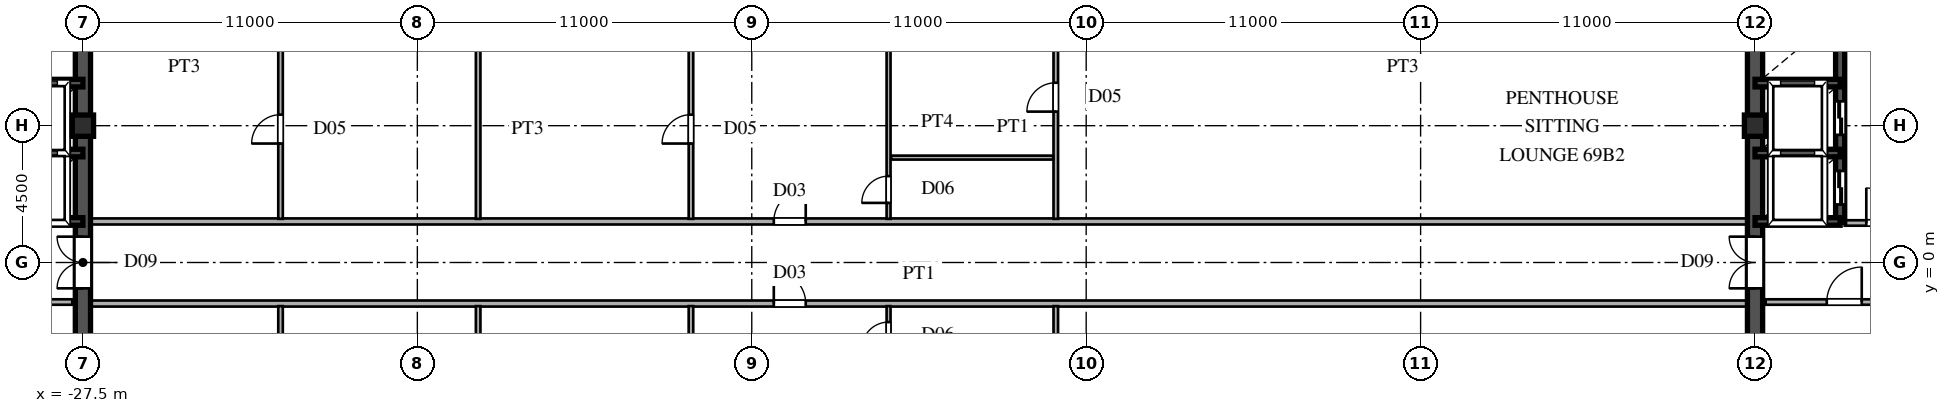
"""IFC4 building model, lengths in metres.
Left out: names, types, materials, properties, quantities, classifications, styles, units other than length and angle.
Written with IfcOpenShell. Run it as: python <this file> out.ifc"""

import sys

from ifc_helpers import new_model, si_unit, direction, frame, frame_2d, origin, origin_2d, place, context, subcontext, project, spatial, rectangle, hollow_rectangle, extrude, source, transform, mapped, element, fill, save


model = new_model("IFC4")
c1 = context("Model", 3, precision=1e-05, world=origin(), true_north=direction((0.0, 1.0)))
c2 = subcontext(c1, "Body", "Model", "MODEL_VIEW")
j1 = project(units=[si_unit("LENGTHUNIT", "METRE"), si_unit("PLANEANGLEUNIT", "RADIAN")], contexts=[c1])
p1 = place(None, origin())
s1 = spatial("IfcSite", under=j1, at=p1, CompositionType="ELEMENT")
p2 = place(p1, origin())
s2 = spatial("IfcBuilding", under=s1, at=p2, CompositionType="ELEMENT")
p3 = place(p2, frame((0.0, 0.0, 261.9)))
s3 = spatial("IfcBuildingStorey", under=s2, at=p3, CompositionType="ELEMENT", Elevation=261.9)
m1 = source(origin(), c2, "Body", "SweptSolid", [
    extrude(hollow_rectangle(XDim=0.7, YDim=0.7, WallThickness=0.03, at=origin_2d()), origin(), (0.0, 0.0, 1.0), 3.75),
])
for number, where, z_axis, x_axis in (
    (1, (-27.5, 4.5, 0.0), (0.0, 0.0, 1.0), (1.0, 0.0, 0.0)),
    (2, (27.5, 4.5, 0.0), (0.0, 0.0, 1.0), (1.0, 0.0, 0.0)),
):
    element("IfcColumn", number, at=place(p3, frame(where, z_axis=z_axis, x_axis=x_axis)), inside=s3, PredefinedType="COLUMN", context=c2, shape_type="MappedRepresentation", body=[
        mapped(m1, transform((0.0, 0.0, 0.0), scale=1.0)),
    ])
for number, where, z_axis, x_axis in (
    (3, (-27.5, -13.5, 0.0), (0.0, 0.0, 1.0), (0.0, 1.0, 0.0)),
    (4, (-27.5, 1.3, 0.0), (0.0, 0.0, 1.0), (0.0, 1.0, 0.0)),
):
    element("IfcWall", number, at=place(p3, frame(where, z_axis=z_axis, x_axis=x_axis)), inside=s3, PredefinedType="SHEAR", context=c2, shape_type="SweptSolid", body=[
        extrude(rectangle(XDim=12.2, YDim=0.5, at=frame_2d((6.1, 0.0))), origin(), (0.0, 0.0, 1.0), 3.53),
    ])
p4 = place(p3, frame((-27.5, -1.3, 0.0), z_axis=(0.0, 0.0, 1.0), x_axis=(0.0, 1.0, 0.0)))
e5 = element("IfcWall", 5, at=p4, inside=s3, PredefinedType="SHEAR", context=c2, shape_type="SweptSolid", body=[
    extrude(rectangle(XDim=2.6, YDim=0.5, at=frame_2d((1.3, 0.0))), origin(), (0.0, 0.0, 1.0), 3.53),
])
p5 = place(p4, frame((0.45, 0.0, 0.0)))
e6 = element("IfcOpeningElement", 6, at=p5, cuts=e5, PredefinedType="OPENING", context=c2, shape_type="SweptSolid", body=[
    extrude(rectangle(XDim=1.7, YDim=2.35, at=frame_2d((0.85, 1.175))), frame((0.0, 0.26, 0.0), z_axis=(0.0, -1.0, 0.0), x_axis=(1.0, 0.0, 0.0)), (0.0, 0.0, 1.0), 0.52),
])
for number, where, z_axis, x_axis in (
    (7, (-30.3, 1.35, 0.0), (0.0, 0.0, 1.0), (1.0, 0.0, 0.0)),
    (8, (-30.3, 3.6, 0.0), (0.0, 0.0, 1.0), (1.0, 0.0, 0.0)),
    (9, (-30.3, 5.9, 0.0), (0.0, 0.0, 1.0), (1.0, 0.0, 0.0)),
):
    element("IfcWall", number, at=place(p3, frame(where, z_axis=z_axis, x_axis=x_axis)), inside=s3, PredefinedType="SHEAR", context=c2, shape_type="SweptSolid", body=[
        extrude(rectangle(XDim=2.8, YDim=0.25, at=frame_2d((1.4, 0.0))), origin(), (0.0, 0.0, 1.0), 3.53),
    ])
p6 = place(p3, frame((-33.02, -1.3, 0.0), z_axis=(0.0, 0.0, 1.0), x_axis=(1.0, 0.0, 0.0)))
e10 = element("IfcWall", 10, at=p6, inside=s3, PredefinedType="PARTITIONING", context=c2, shape_type="SweptSolid", body=[
    extrude(rectangle(XDim=5.17, YDim=0.18, at=frame_2d((2.585, 0.0))), origin(), (0.0, 0.0, 1.0), 3.53),
])
p7 = place(p6, frame((2.01, 0.0, 0.0)))
e11 = element("IfcOpeningElement", 11, at=p7, cuts=e10, PredefinedType="OPENING", context=c2, shape_type="SweptSolid", body=[
    extrude(rectangle(XDim=1.15, YDim=2.2, at=frame_2d((0.575, 1.1))), frame((0.0, 0.1, 0.0), z_axis=(0.0, -1.0, 0.0), x_axis=(1.0, 0.0, 0.0)), (0.0, 0.0, 1.0), 0.2),
])
for number, where, z_axis, x_axis in (
    (12, (27.5, -13.5, 0.0), (0.0, 0.0, 1.0), (0.0, 1.0, 0.0)),
    (13, (27.5, 1.3, 0.0), (0.0, 0.0, 1.0), (0.0, 1.0, 0.0)),
):
    element("IfcWall", number, at=place(p3, frame(where, z_axis=z_axis, x_axis=x_axis)), inside=s3, PredefinedType="SHEAR", context=c2, shape_type="SweptSolid", body=[
        extrude(rectangle(XDim=12.2, YDim=0.5, at=frame_2d((6.1, 0.0))), origin(), (0.0, 0.0, 1.0), 3.53),
    ])
p8 = place(p3, frame((27.5, -1.3, 0.0), z_axis=(0.0, 0.0, 1.0), x_axis=(0.0, 1.0, 0.0)))
e14 = element("IfcWall", 14, at=p8, inside=s3, PredefinedType="SHEAR", context=c2, shape_type="SweptSolid", body=[
    extrude(rectangle(XDim=2.6, YDim=0.5, at=frame_2d((1.3, 0.0))), origin(), (0.0, 0.0, 1.0), 3.53),
])
p9 = place(p8, frame((0.45, 0.0, 0.0)))
e15 = element("IfcOpeningElement", 15, at=p9, cuts=e14, PredefinedType="OPENING", context=c2, shape_type="SweptSolid", body=[
    extrude(rectangle(XDim=1.7, YDim=2.35, at=frame_2d((0.85, 1.175))), frame((0.0, 0.26, 0.0), z_axis=(0.0, -1.0, 0.0), x_axis=(1.0, 0.0, 0.0)), (0.0, 0.0, 1.0), 0.52),
])
for number, where, z_axis, x_axis in (
    (16, (27.5, 1.35, 0.0), (0.0, 0.0, 1.0), (1.0, 0.0, 0.0)),
    (17, (27.5, 3.6, 0.0), (0.0, 0.0, 1.0), (1.0, 0.0, 0.0)),
    (18, (27.5, 5.9, 0.0), (0.0, 0.0, 1.0), (1.0, 0.0, 0.0)),
):
    element("IfcWall", number, at=place(p3, frame(where, z_axis=z_axis, x_axis=x_axis)), inside=s3, PredefinedType="SHEAR", context=c2, shape_type="SweptSolid", body=[
        extrude(rectangle(XDim=2.8, YDim=0.25, at=frame_2d((1.4, 0.0))), origin(), (0.0, 0.0, 1.0), 3.53),
    ])
p10 = place(p3, frame((30.3, 1.32, 0.0), z_axis=(0.0, 0.0, 1.0), x_axis=(0.0, 1.0, 0.0)))
e19 = element("IfcWall", 19, at=p10, inside=s3, PredefinedType="SHEAR", context=c2, shape_type="SweptSolid", body=[
    extrude(rectangle(XDim=2.28, YDim=0.3, at=frame_2d((1.14, 0.0))), origin(), (0.0, 0.0, 1.0), 3.53),
])
p11 = place(p10, frame((0.59, 0.0, 0.0)))
e20 = element("IfcOpeningElement", 20, at=p11, cuts=e19, PredefinedType="OPENING", context=c2, shape_type="SweptSolid", body=[
    extrude(rectangle(XDim=1.1, YDim=2.2, at=frame_2d((0.55, 1.1))), frame((0.0, 0.16, 0.0), z_axis=(0.0, -1.0, 0.0), x_axis=(1.0, 0.0, 0.0)), (0.0, 0.0, 1.0), 0.32),
])
p12 = place(p3, frame((30.3, 3.6, 0.0), z_axis=(0.0, 0.0, 1.0), x_axis=(0.0, 1.0, 0.0)))
e21 = element("IfcWall", 21, at=p12, inside=s3, PredefinedType="SHEAR", context=c2, shape_type="SweptSolid", body=[
    extrude(rectangle(XDim=2.3, YDim=0.3, at=frame_2d((1.15, 0.0))), origin(), (0.0, 0.0, 1.0), 3.53),
])
p13 = place(p12, frame((0.6, 0.0, 0.0)))
e22 = element("IfcOpeningElement", 22, at=p13, cuts=e21, PredefinedType="OPENING", context=c2, shape_type="SweptSolid", body=[
    extrude(rectangle(XDim=1.1, YDim=2.2, at=frame_2d((0.55, 1.1))), frame((0.0, 0.16, 0.0), z_axis=(0.0, -1.0, 0.0), x_axis=(1.0, 0.0, 0.0)), (0.0, 0.0, 1.0), 0.32),
])
p14 = place(p3, frame((30.3, 5.9, 0.0), z_axis=(0.0, 0.0, 1.0), x_axis=(0.0, 1.0, 0.0)))
e23 = element("IfcWall", 23, at=p14, inside=s3, PredefinedType="SHEAR", context=c2, shape_type="SweptSolid", body=[
    extrude(rectangle(XDim=2.25, YDim=0.3, at=frame_2d((1.125, 0.0))), origin(), (0.0, 0.0, 1.0), 3.53),
])
p15 = place(p3, frame((27.85, -1.3, 0.0), z_axis=(0.0, 0.0, 1.0), x_axis=(1.0, 0.0, 0.0)))
e24 = element("IfcWall", 24, at=p15, inside=s3, PredefinedType="PARTITIONING", context=c2, shape_type="SweptSolid", body=[
    extrude(rectangle(XDim=5.17, YDim=0.18, at=frame_2d((2.585, 0.0))), origin(), (0.0, 0.0, 1.0), 3.53),
])
p16 = place(p15, frame((2.01, 0.0, 0.0)))
e25 = element("IfcOpeningElement", 25, at=p16, cuts=e24, PredefinedType="OPENING", context=c2, shape_type="SweptSolid", body=[
    extrude(rectangle(XDim=1.15, YDim=2.2, at=frame_2d((0.575, 1.1))), frame((0.0, 0.1, 0.0), z_axis=(0.0, -1.0, 0.0), x_axis=(1.0, 0.0, 0.0)), (0.0, 0.0, 1.0), 0.2),
])
p17 = place(p3, frame((30.45, 1.3, 0.0), z_axis=(0.0, 0.0, 1.0), x_axis=(1.0, 0.0, 0.0)))
e26 = element("IfcWall", 26, at=p17, inside=s3, PredefinedType="PARTITIONING", context=c2, shape_type="SweptSolid", body=[
    extrude(rectangle(XDim=2.57, YDim=0.18, at=frame_2d((1.285, 0.0))), origin(), (0.0, 0.0, 1.0), 3.53),
])
p18 = place(p17, frame((0.71, 0.0, 0.0)))
e27 = element("IfcOpeningElement", 27, at=p18, cuts=e26, PredefinedType="OPENING", context=c2, shape_type="SweptSolid", body=[
    extrude(rectangle(XDim=1.15, YDim=2.2, at=frame_2d((0.575, 1.1))), frame((0.0, 0.1, 0.0), z_axis=(0.0, -1.0, 0.0), x_axis=(1.0, 0.0, 0.0)), (0.0, 0.0, 1.0), 0.2),
])
p19 = place(p3, frame((-27.245, -1.35, 0.0), z_axis=(0.0, 0.0, 1.0), x_axis=(1.0, 0.0, 0.0)))
e28 = element("IfcWall", 28, at=p19, inside=s3, PredefinedType="PARTITIONING", context=c2, shape_type="SweptSolid", body=[
    extrude(rectangle(XDim=54.49, YDim=0.2, at=frame_2d((27.245, 0.0))), origin(), (0.0, 0.0, 1.0), 3.53),
])
p20 = place(p19, frame((22.47, 0.0, 0.0)))
e29 = element("IfcOpeningElement", 29, at=p20, cuts=e28, PredefinedType="OPENING", context=c2, shape_type="SweptSolid", body=[
    extrude(rectangle(XDim=1.05, YDim=2.25, at=frame_2d((0.525, 1.125))), frame((0.0, 0.11, 0.0), z_axis=(0.0, -1.0, 0.0), x_axis=(1.0, 0.0, 0.0)), (0.0, 0.0, 1.0), 0.22),
])
p21 = place(p3, frame((-27.245, 1.35, 0.0), z_axis=(0.0, 0.0, 1.0), x_axis=(1.0, 0.0, 0.0)))
e30 = element("IfcWall", 30, at=p21, inside=s3, PredefinedType="PARTITIONING", context=c2, shape_type="SweptSolid", body=[
    extrude(rectangle(XDim=54.49, YDim=0.2, at=frame_2d((27.245, 0.0))), origin(), (0.0, 0.0, 1.0), 3.53),
])
p22 = place(p21, frame((22.47, 0.0, 0.0)))
e31 = element("IfcOpeningElement", 31, at=p22, cuts=e30, PredefinedType="OPENING", context=c2, shape_type="SweptSolid", body=[
    extrude(rectangle(XDim=1.05, YDim=2.25, at=frame_2d((0.525, 1.125))), frame((0.0, 0.11, 0.0), z_axis=(0.0, -1.0, 0.0), x_axis=(1.0, 0.0, 0.0)), (0.0, 0.0, 1.0), 0.22),
])
p23 = place(p3, frame((-0.915, 3.45, 0.0), z_axis=(0.0, 0.0, 1.0), x_axis=(1.0, 0.0, 0.0)))
e32 = element("IfcWall", 32, at=p23, inside=s3, PredefinedType="PARTITIONING", context=c2, shape_type="SweptSolid", body=[
    extrude(rectangle(XDim=5.33, YDim=0.13, at=frame_2d((2.665, 0.0))), origin(), (0.0, 0.0, 1.0), 3.53),
])
p24 = place(p3, frame((-21.0, -13.5, 0.0), z_axis=(0.0, 0.0, 1.0), x_axis=(0.0, 1.0, 0.0)))
e33 = element("IfcWall", 33, at=p24, inside=s3, PredefinedType="PARTITIONING", context=c2, shape_type="SweptSolid", body=[
    extrude(rectangle(XDim=12.065, YDim=0.15, at=frame_2d((6.032, 0.0))), origin(), (0.0, 0.0, 1.0), 3.53),
])
p25 = place(p24, frame((8.637, 0.0, 0.0)))
e34 = element("IfcOpeningElement", 34, at=p25, cuts=e33, PredefinedType="OPENING", context=c2, shape_type="SweptSolid", body=[
    extrude(rectangle(XDim=0.95, YDim=2.15, at=frame_2d((0.475, 1.075))), frame((0.0, 0.085, 0.0), z_axis=(0.0, -1.0, 0.0), x_axis=(1.0, 0.0, 0.0)), (0.0, 0.0, 1.0), 0.17),
])
p26 = place(p3, frame((-21.0, 1.435, 0.0), z_axis=(0.0, 0.0, 1.0), x_axis=(0.0, 1.0, 0.0)))
e35 = element("IfcWall", 35, at=p26, inside=s3, PredefinedType="PARTITIONING", context=c2, shape_type="SweptSolid", body=[
    extrude(rectangle(XDim=12.065, YDim=0.15, at=frame_2d((6.032, 0.0))), origin(), (0.0, 0.0, 1.0), 3.53),
])
p27 = place(p26, frame((2.478, 0.0, 0.0)))
e36 = element("IfcOpeningElement", 36, at=p27, cuts=e35, PredefinedType="OPENING", context=c2, shape_type="SweptSolid", body=[
    extrude(rectangle(XDim=0.95, YDim=2.15, at=frame_2d((0.475, 1.075))), frame((0.0, 0.085, 0.0), z_axis=(0.0, -1.0, 0.0), x_axis=(1.0, 0.0, 0.0)), (0.0, 0.0, 1.0), 0.17),
])
for number, where, z_axis, x_axis in (
    (37, (-14.5, -7.34, 0.0), (0.0, 0.0, 1.0), (0.0, 1.0, 0.0)),
    (38, (-14.5, 1.435, 0.0), (0.0, 0.0, 1.0), (0.0, 1.0, 0.0)),
):
    element("IfcWall", number, at=place(p3, frame(where, z_axis=z_axis, x_axis=x_axis)), inside=s3, PredefinedType="PARTITIONING", context=c2, shape_type="SweptSolid", body=[
        extrude(rectangle(XDim=5.905, YDim=0.15, at=frame_2d((2.953, 0.0))), origin(), (0.0, 0.0, 1.0), 3.53),
    ])
p28 = place(p3, frame((-7.5, -13.5, 0.0), z_axis=(0.0, 0.0, 1.0), x_axis=(0.0, 1.0, 0.0)))
e39 = element("IfcWall", 39, at=p28, inside=s3, PredefinedType="PARTITIONING", context=c2, shape_type="SweptSolid", body=[
    extrude(rectangle(XDim=12.065, YDim=0.15, at=frame_2d((6.032, 0.0))), origin(), (0.0, 0.0, 1.0), 3.53),
])
p29 = place(p28, frame((8.637, 0.0, 0.0)))
e40 = element("IfcOpeningElement", 40, at=p29, cuts=e39, PredefinedType="OPENING", context=c2, shape_type="SweptSolid", body=[
    extrude(rectangle(XDim=0.95, YDim=2.15, at=frame_2d((0.475, 1.075))), frame((0.0, 0.085, 0.0), z_axis=(0.0, -1.0, 0.0), x_axis=(1.0, 0.0, 0.0)), (0.0, 0.0, 1.0), 0.17),
])
p30 = place(p28, frame((2.562, 0.0, 0.0)))
e41 = element("IfcOpeningElement", 41, at=p30, cuts=e39, PredefinedType="OPENING", context=c2, shape_type="SweptSolid", body=[
    extrude(rectangle(XDim=0.95, YDim=2.15, at=frame_2d((0.475, 1.075))), frame((0.0, 0.085, 0.0), z_axis=(0.0, -1.0, 0.0), x_axis=(1.0, 0.0, 0.0)), (0.0, 0.0, 1.0), 0.17),
])
p31 = place(p3, frame((-7.5, 1.435, 0.0), z_axis=(0.0, 0.0, 1.0), x_axis=(0.0, 1.0, 0.0)))
e42 = element("IfcWall", 42, at=p31, inside=s3, PredefinedType="PARTITIONING", context=c2, shape_type="SweptSolid", body=[
    extrude(rectangle(XDim=12.065, YDim=0.15, at=frame_2d((6.032, 0.0))), origin(), (0.0, 0.0, 1.0), 3.53),
])
p32 = place(p31, frame((2.478, 0.0, 0.0)))
e43 = element("IfcOpeningElement", 43, at=p32, cuts=e42, PredefinedType="OPENING", context=c2, shape_type="SweptSolid", body=[
    extrude(rectangle(XDim=0.95, YDim=2.15, at=frame_2d((0.475, 1.075))), frame((0.0, 0.085, 0.0), z_axis=(0.0, -1.0, 0.0), x_axis=(1.0, 0.0, 0.0)), (0.0, 0.0, 1.0), 0.17),
])
p33 = place(p31, frame((8.552, 0.0, 0.0)))
e44 = element("IfcOpeningElement", 44, at=p33, cuts=e42, PredefinedType="OPENING", context=c2, shape_type="SweptSolid", body=[
    extrude(rectangle(XDim=0.95, YDim=2.15, at=frame_2d((0.475, 1.075))), frame((0.0, 0.085, 0.0), z_axis=(0.0, -1.0, 0.0), x_axis=(1.0, 0.0, 0.0)), (0.0, 0.0, 1.0), 0.17),
])
p34 = place(p3, frame((-1.0, -13.5, 0.0), z_axis=(0.0, 0.0, 1.0), x_axis=(0.0, 1.0, 0.0)))
e45 = element("IfcWall", 45, at=p34, inside=s3, PredefinedType="PARTITIONING", context=c2, shape_type="SweptSolid", body=[
    extrude(rectangle(XDim=12.065, YDim=0.13, at=frame_2d((6.032, 0.0))), origin(), (0.0, 0.0, 1.0), 3.53),
])
p35 = place(p34, frame((10.66, 0.0, 0.0)))
e46 = element("IfcOpeningElement", 46, at=p35, cuts=e45, PredefinedType="OPENING", context=c2, shape_type="SweptSolid", body=[
    extrude(rectangle(XDim=0.88, YDim=2.1, at=frame_2d((0.44, 1.05))), frame((0.0, 0.075, 0.0), z_axis=(0.0, -1.0, 0.0), x_axis=(1.0, 0.0, 0.0)), (0.0, 0.0, 1.0), 0.15),
])
p36 = place(p34, frame((4.55, 0.0, 0.0)))
e47 = element("IfcOpeningElement", 47, at=p36, cuts=e45, PredefinedType="OPENING", context=c2, shape_type="SweptSolid", body=[
    extrude(rectangle(XDim=0.95, YDim=2.15, at=frame_2d((0.475, 1.075))), frame((0.0, 0.075, 0.0), z_axis=(0.0, -1.0, 0.0), x_axis=(1.0, 0.0, 0.0)), (0.0, 0.0, 1.0), 0.15),
])
p37 = place(p3, frame((-1.0, 1.435, 0.0), z_axis=(0.0, 0.0, 1.0), x_axis=(0.0, 1.0, 0.0)))
e48 = element("IfcWall", 48, at=p37, inside=s3, PredefinedType="PARTITIONING", context=c2, shape_type="SweptSolid", body=[
    extrude(rectangle(XDim=12.065, YDim=0.13, at=frame_2d((6.032, 0.0))), origin(), (0.0, 0.0, 1.0), 3.53),
])
p38 = place(p37, frame((0.525, 0.0, 0.0)))
e49 = element("IfcOpeningElement", 49, at=p38, cuts=e48, PredefinedType="OPENING", context=c2, shape_type="SweptSolid", body=[
    extrude(rectangle(XDim=0.88, YDim=2.1, at=frame_2d((0.44, 1.05))), frame((0.0, 0.075, 0.0), z_axis=(0.0, -1.0, 0.0), x_axis=(1.0, 0.0, 0.0)), (0.0, 0.0, 1.0), 0.15),
])
p39 = place(p37, frame((6.565, 0.0, 0.0)))
e50 = element("IfcOpeningElement", 50, at=p39, cuts=e48, PredefinedType="OPENING", context=c2, shape_type="SweptSolid", body=[
    extrude(rectangle(XDim=0.95, YDim=2.15, at=frame_2d((0.475, 1.075))), frame((0.0, 0.075, 0.0), z_axis=(0.0, -1.0, 0.0), x_axis=(1.0, 0.0, 0.0)), (0.0, 0.0, 1.0), 0.15),
])
p40 = place(p3, frame((4.5, -13.5, 0.0), z_axis=(0.0, 0.0, 1.0), x_axis=(0.0, 1.0, 0.0)))
e51 = element("IfcWall", 51, at=p40, inside=s3, PredefinedType="PARTITIONING", context=c2, shape_type="SweptSolid", body=[
    extrude(rectangle(XDim=12.065, YDim=0.15, at=frame_2d((6.032, 0.0))), origin(), (0.0, 0.0, 1.0), 3.53),
])
p41 = place(p40, frame((7.587, 0.0, 0.0)))
e52 = element("IfcOpeningElement", 52, at=p41, cuts=e51, PredefinedType="OPENING", context=c2, shape_type="SweptSolid", body=[
    extrude(rectangle(XDim=0.95, YDim=2.15, at=frame_2d((0.475, 1.075))), frame((0.0, 0.085, 0.0), z_axis=(0.0, -1.0, 0.0), x_axis=(1.0, 0.0, 0.0)), (0.0, 0.0, 1.0), 0.17),
])
p42 = place(p3, frame((4.5, 1.435, 0.0), z_axis=(0.0, 0.0, 1.0), x_axis=(0.0, 1.0, 0.0)))
e53 = element("IfcWall", 53, at=p42, inside=s3, PredefinedType="PARTITIONING", context=c2, shape_type="SweptSolid", body=[
    extrude(rectangle(XDim=12.065, YDim=0.15, at=frame_2d((6.032, 0.0))), origin(), (0.0, 0.0, 1.0), 3.53),
])
p43 = place(p42, frame((3.528, 0.0, 0.0)))
e54 = element("IfcOpeningElement", 54, at=p43, cuts=e53, PredefinedType="OPENING", context=c2, shape_type="SweptSolid", body=[
    extrude(rectangle(XDim=0.95, YDim=2.15, at=frame_2d((0.475, 1.075))), frame((0.0, 0.085, 0.0), z_axis=(0.0, -1.0, 0.0), x_axis=(1.0, 0.0, 0.0)), (0.0, 0.0, 1.0), 0.17),
])
m2 = source(origin(), c2, "Body", "SweptSolid", [
    extrude(rectangle(XDim=1.7, YDim=2.35, at=frame_2d((0.85, 1.175))), frame((0.0, 0.025, 0.0), z_axis=(0.0, -1.0, 0.0), x_axis=(1.0, 0.0, 0.0)), (0.0, 0.0, 1.0), 0.05),
])
p44 = place(p5, origin())
e55 = element("IfcDoor", 55, at=p44, inside=s3, OperationType="DOUBLE_SWING_LEFT", PredefinedType="DOOR", context=c2, shape_type="MappedRepresentation", body=[
    mapped(m2, transform((0.0, 0.0, 0.0), scale=1.0)),
])
fill(e6, e55)
p45 = place(p9, origin())
e56 = element("IfcDoor", 56, at=p45, inside=s3, OperationType="DOUBLE_SWING_LEFT", PredefinedType="DOOR", context=c2, shape_type="MappedRepresentation", body=[
    mapped(m2, transform((0.0, 0.0, 0.0), scale=1.0)),
])
fill(e15, e56)
m3 = source(origin(), c2, "Body", "SweptSolid", [
    extrude(rectangle(XDim=1.1, YDim=2.2, at=frame_2d((0.55, 1.1))), frame((0.0, 0.025, 0.0), z_axis=(0.0, -1.0, 0.0), x_axis=(1.0, 0.0, 0.0)), (0.0, 0.0, 1.0), 0.05),
])
p46 = place(p11, origin())
e57 = element("IfcDoor", 57, at=p46, inside=s3, OperationType="DOUBLE_DOOR_SLIDING", PredefinedType="DOOR", context=c2, shape_type="MappedRepresentation", body=[
    mapped(m3, transform((0.0, 0.0, 0.0), scale=1.0)),
])
fill(e20, e57)
p47 = place(p13, origin())
e58 = element("IfcDoor", 58, at=p47, inside=s3, OperationType="DOUBLE_DOOR_SLIDING", PredefinedType="DOOR", context=c2, shape_type="MappedRepresentation", body=[
    mapped(m3, transform((0.0, 0.0, 0.0), scale=1.0)),
])
fill(e22, e58)
m4 = source(origin(), c2, "Body", "SweptSolid", [
    extrude(rectangle(XDim=1.15, YDim=2.2, at=frame_2d((0.575, 1.1))), frame((0.0, 0.025, 0.0), z_axis=(0.0, -1.0, 0.0), x_axis=(1.0, 0.0, 0.0)), (0.0, 0.0, 1.0), 0.05),
])
p48 = place(p16, origin())
e59 = element("IfcDoor", 59, at=p48, inside=s3, OperationType="SINGLE_SWING_RIGHT", PredefinedType="DOOR", context=c2, shape_type="MappedRepresentation", body=[
    mapped(m4, transform((0.0, 0.0, 0.0), scale=1.0)),
])
fill(e25, e59)
p49 = place(p18, origin())
e60 = element("IfcDoor", 60, at=p49, inside=s3, OperationType="SINGLE_SWING_LEFT", PredefinedType="DOOR", context=c2, shape_type="MappedRepresentation", body=[
    mapped(m4, transform((0.0, 0.0, 0.0), scale=1.0)),
])
fill(e27, e60)
m5 = source(origin(), c2, "Body", "SweptSolid", [
    extrude(rectangle(XDim=1.05, YDim=2.25, at=frame_2d((0.525, 1.125))), frame((0.0, 0.025, 0.0), z_axis=(0.0, -1.0, 0.0), x_axis=(1.0, 0.0, 0.0)), (0.0, 0.0, 1.0), 0.05),
])
p50 = place(p20, origin())
e61 = element("IfcDoor", 61, at=p50, inside=s3, OperationType="SINGLE_SWING_LEFT", PredefinedType="DOOR", context=c2, shape_type="MappedRepresentation", body=[
    mapped(m5, transform((0.0, 0.0, 0.0), scale=1.0)),
])
fill(e29, e61)
p51 = place(p22, origin())
e62 = element("IfcDoor", 62, at=p51, inside=s3, OperationType="SINGLE_SWING_RIGHT", PredefinedType="DOOR", context=c2, shape_type="MappedRepresentation", body=[
    mapped(m5, transform((0.0, 0.0, 0.0), scale=1.0)),
])
fill(e31, e62)
m6 = source(origin(), c2, "Body", "SweptSolid", [
    extrude(rectangle(XDim=0.95, YDim=2.15, at=frame_2d((0.475, 1.075))), frame((0.0, 0.025, 0.0), z_axis=(0.0, -1.0, 0.0), x_axis=(1.0, 0.0, 0.0)), (0.0, 0.0, 1.0), 0.05),
])
p52 = place(p27, origin())
e63 = element("IfcDoor", 63, at=p52, inside=s3, OperationType="SINGLE_SWING_LEFT", PredefinedType="DOOR", context=c2, shape_type="MappedRepresentation", body=[
    mapped(m6, transform((0.0, 0.0, 0.0), scale=1.0)),
])
fill(e36, e63)
p53 = place(p32, origin())
e64 = element("IfcDoor", 64, at=p53, inside=s3, OperationType="SINGLE_SWING_LEFT", PredefinedType="DOOR", context=c2, shape_type="MappedRepresentation", body=[
    mapped(m6, transform((0.0, 0.0, 0.0), scale=1.0)),
])
fill(e43, e64)
m7 = source(origin(), c2, "Body", "SweptSolid", [
    extrude(rectangle(XDim=0.88, YDim=2.1, at=frame_2d((0.44, 1.05))), frame((0.0, 0.025, 0.0), z_axis=(0.0, -1.0, 0.0), x_axis=(1.0, 0.0, 0.0)), (0.0, 0.0, 1.0), 0.05),
])
p54 = place(p35, origin())
e65 = element("IfcDoor", 65, at=p54, inside=s3, OperationType="SINGLE_SWING_LEFT", PredefinedType="DOOR", context=c2, shape_type="MappedRepresentation", body=[
    mapped(m7, transform((0.0, 0.0, 0.0), scale=1.0)),
])
fill(e46, e65)
p55 = place(p38, origin())
e66 = element("IfcDoor", 66, at=p55, inside=s3, OperationType="SINGLE_SWING_LEFT", PredefinedType="DOOR", context=c2, shape_type="MappedRepresentation", body=[
    mapped(m7, transform((0.0, 0.0, 0.0), scale=1.0)),
])
fill(e49, e66)
p56 = place(p43, origin())
e67 = element("IfcDoor", 67, at=p56, inside=s3, OperationType="SINGLE_SWING_LEFT", PredefinedType="DOOR", context=c2, shape_type="MappedRepresentation", body=[
    mapped(m6, transform((0.0, 0.0, 0.0), scale=1.0)),
])
fill(e54, e67)
save(model, sys.argv[1])
